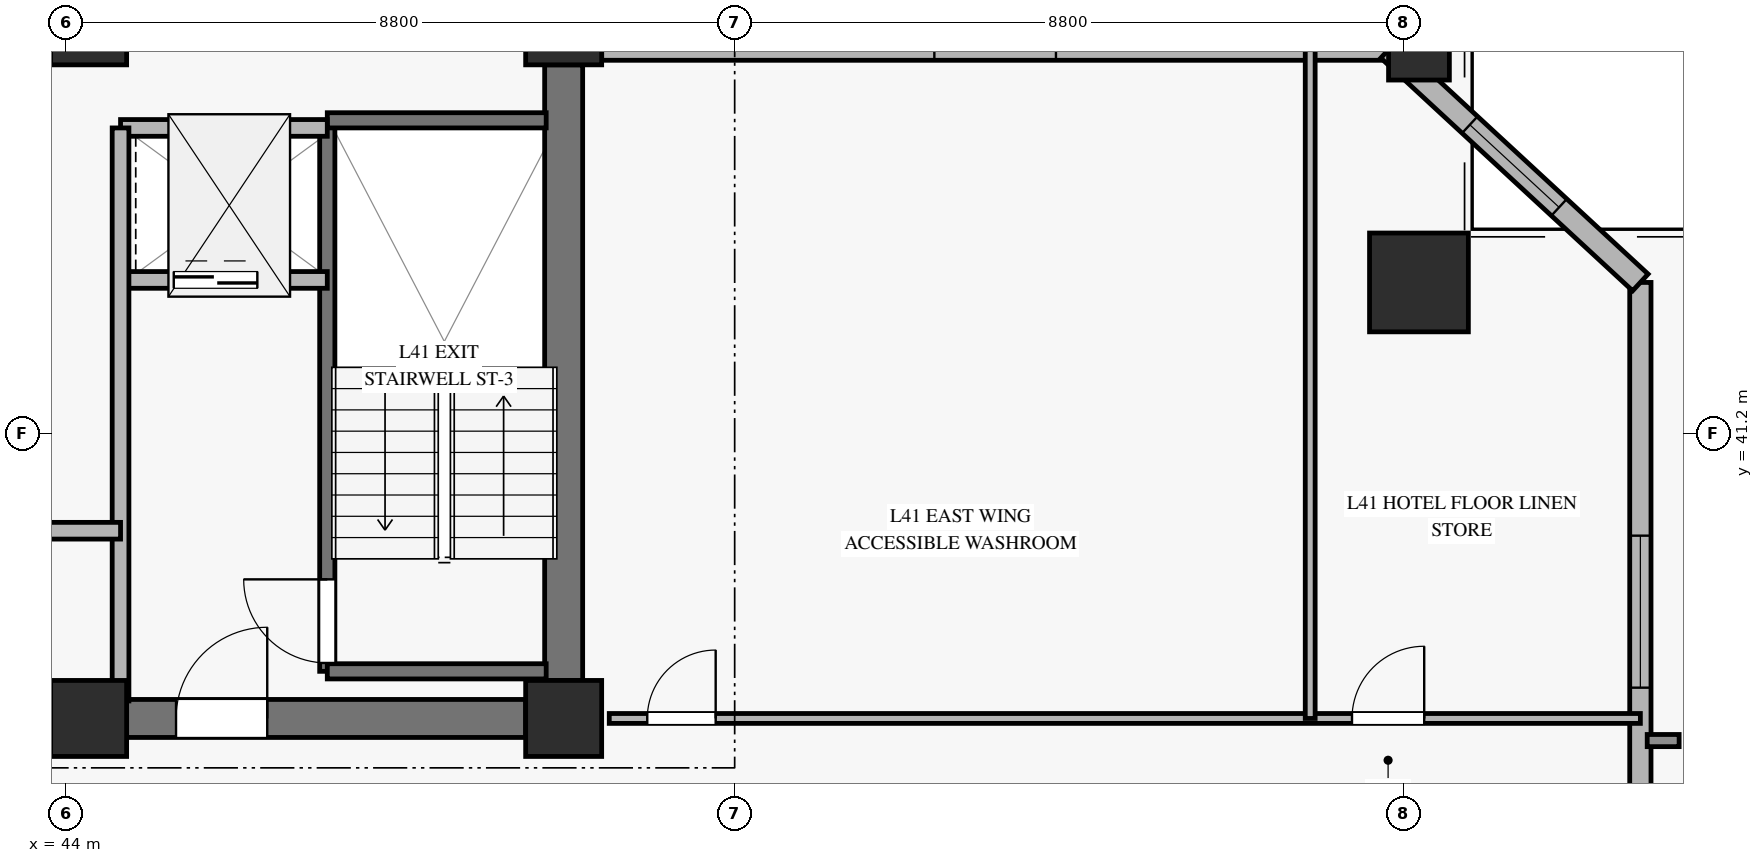
"""IFC4 building model, lengths in metres.
Left out: names, types, materials, properties, quantities, classifications, styles, units other than length and angle.
Written with IfcOpenShell. Run it as: python <this file> out.ifc"""

import sys

from ifc_helpers import new_model, si_unit, direction, frame, frame_2d, origin, origin_2d, place, context, subcontext, project, spatial, rectangle, hollow_rectangle, extrude, source, transform, mapped, element, fill, save


model = new_model("IFC4")
c1 = context("Model", 3, precision=1e-05, world=origin(), true_north=direction((0.0, 1.0)))
c2 = subcontext(c1, "Body", "Model", "MODEL_VIEW")
j1 = project(units=[si_unit("LENGTHUNIT", "METRE"), si_unit("PLANEANGLEUNIT", "RADIAN")], contexts=[c1])
p1 = place(None, origin())
s1 = spatial("IfcSite", under=j1, at=p1, CompositionType="ELEMENT")
p2 = place(p1, origin())
s2 = spatial("IfcBuilding", under=s1, at=p2, CompositionType="ELEMENT")
p3 = place(p2, frame((0.0, 0.0, 166.7)))
s3 = spatial("IfcBuildingStorey", under=s2, at=p3, CompositionType="ELEMENT", Elevation=166.7)
m1 = source(origin(), c2, "Body", "SweptSolid", [
    extrude(rectangle(XDim=1.0, YDim=1.0, at=origin_2d()), origin(), (0.0, 0.0, 1.0), 3.27),
])
for number, where, z_axis, x_axis in (
    (1, (44.3, 37.45, 0.0), (0.0, 0.0, 1.0), (1.0, 0.0, 0.0)),
    (2, (44.3, 46.55, 0.0), (0.0, 0.0, 1.0), (1.0, 0.0, 0.0)),
    (3, (50.55, 37.45, 0.0), (0.0, 0.0, 1.0), (1.0, 0.0, 0.0)),
    (4, (50.55, 46.55, 0.0), (0.0, 0.0, 1.0), (1.0, 0.0, 0.0)),
):
    element("IfcColumn", number, at=place(p3, frame(where, z_axis=z_axis, x_axis=x_axis)), inside=s3, PredefinedType="PILASTER", context=c2, shape_type="MappedRepresentation", body=[
        mapped(m1, transform((0.0, 0.0, 0.0), x_axis=(1.0, 0.0, 0.0), y_axis=(0.0, 1.0, 0.0), z_axis=(0.0, 0.0, 1.0), scale=1.0)),
    ])
p4 = place(p3, frame((44.8, 37.45, 0.0), z_axis=(0.0, 0.0, 1.0), x_axis=(1.0, 0.0, 0.0)))
e5 = element("IfcWall", 5, at=p4, inside=s3, PredefinedType="SHEAR", context=c2, shape_type="SweptSolid", body=[
    extrude(rectangle(XDim=5.25, YDim=0.5, at=frame_2d((2.625, 0.0))), origin(), (0.0, 0.0, 1.0), 3.27),
])
p5 = place(p4, frame((0.65, 0.0, 0.0)))
e6 = element("IfcOpeningElement", 6, at=p5, cuts=e5, PredefinedType="OPENING", context=c2, shape_type="SweptSolid", body=[
    extrude(rectangle(XDim=1.2, YDim=2.15, at=frame_2d((0.6, 1.075))), frame((0.0, 0.26, 0.0), z_axis=(0.0, -1.0, 0.0), x_axis=(1.0, 0.0, 0.0)), (0.0, 0.0, 1.0), 0.52),
])
p6 = place(p3, frame((50.55, 37.95, 0.0), z_axis=(0.0, 0.0, 1.0), x_axis=(0.0, 1.0, 0.0)))
e7 = element("IfcWall", 7, at=p6, inside=s3, PredefinedType="SHEAR", context=c2, shape_type="SweptSolid", body=[
    extrude(rectangle(XDim=8.1, YDim=0.5, at=frame_2d((4.05, 0.0))), origin(), (0.0, 0.0, 1.0), 3.27),
])
m2 = source(origin(), c2, "Body", "SweptSolid", [
    extrude(hollow_rectangle(XDim=1.3, YDim=1.3, WallThickness=0.06, at=origin_2d()), origin(), (0.0, 0.0, 1.0), 3.277),
])
p7 = place(p3, frame((61.803, 43.187, 0.0), z_axis=(-0.063777107469, 0.007897632467, 0.997932917567), x_axis=(-0.122893119903, -0.992419911671, 0.0)))
e8 = element("IfcColumn", 8, at=p7, inside=s3, PredefinedType="COLUMN", context=c2, shape_type="MappedRepresentation", body=[
    mapped(m2, transform((0.0, 0.0, 0.0), x_axis=(1.0, 0.0, 0.0), y_axis=(0.0, 1.0, 0.0), z_axis=(0.0, 0.0, 1.0), scale=1.0)),
])
m3 = source(origin(), c2, "Body", "SweptSolid", [
    extrude(hollow_rectangle(XDim=0.8, YDim=0.8, WallThickness=0.036, at=origin_2d()), origin(), (0.0, 0.0, 1.0), 3.277),
])
p8 = place(p3, frame((61.803, 46.25, 0.0), z_axis=(-0.063779096534, 0.0, 0.997964040858), x_axis=(0.0, -1.0, 0.0)))
e9 = element("IfcColumn", 9, at=p8, inside=s3, PredefinedType="COLUMN", context=c2, shape_type="MappedRepresentation", body=[
    mapped(m3, transform((0.0, 0.0, 0.0), x_axis=(1.0, 0.0, 0.0), y_axis=(0.0, 1.0, 0.0), z_axis=(0.0, 0.0, 1.0), scale=1.0)),
])
p9 = place(p3, frame((64.716, 27.999, 0.0), z_axis=(0.0, 0.0, 1.0), x_axis=(0.0, 1.0, 0.0)))
e10 = element("IfcWall", 10, at=p9, inside=s3, PredefinedType="SOLIDWALL", context=c2, shape_type="SweptSolid", body=[
    extrude(rectangle(XDim=15.188, YDim=0.28, at=frame_2d((7.594, 0.0))), origin(), (0.0, 0.0, 1.0), 2.75),
])
p10 = place(p9, frame((9.856, 0.0, 0.45)))
e11 = element("IfcOpeningElement", 11, at=p10, cuts=e10, PredefinedType="OPENING", context=c2, shape_type="SweptSolid", body=[
    extrude(rectangle(XDim=2.0, YDim=2.0, at=frame_2d((1.0, 1.0))), frame((0.0, 0.15, 0.0), z_axis=(0.0, -1.0, 0.0), x_axis=(1.0, 0.0, 0.0)), (0.0, 0.0, 1.0), 0.3),
])
p11 = place(p3, frame((51.05, 46.25, 0.0), z_axis=(0.0, 0.0, 1.0), x_axis=(1.0, 0.0, 0.0)))
e12 = element("IfcWall", 12, at=p11, inside=s3, PredefinedType="SOLIDWALL", context=c2, shape_type="SweptSolid", body=[
    extrude(rectangle(XDim=10.353, YDim=0.28, at=frame_2d((5.177, 0.0))), origin(), (0.0, 0.0, 1.0), 2.75),
])
p12 = place(p11, frame((4.377, 0.0, 0.45)))
e13 = element("IfcOpeningElement", 13, at=p12, cuts=e12, PredefinedType="OPENING", context=c2, shape_type="SweptSolid", body=[
    extrude(rectangle(XDim=1.6, YDim=2.0, at=frame_2d((0.8, 1.0))), frame((0.0, 0.15, 0.0), z_axis=(0.0, -1.0, 0.0), x_axis=(1.0, 0.0, 0.0)), (0.0, 0.0, 1.0), 0.3),
])
p13 = place(p3, frame((64.716, 43.187, 0.0), z_axis=(0.0, 0.0, 1.0), x_axis=(-0.734267997056, 0.678859711943, 0.0)))
e14 = element("IfcWall", 14, at=p13, inside=s3, PredefinedType="SOLIDWALL", context=c2, shape_type="SweptSolid", body=[
    extrude(rectangle(XDim=4.512, YDim=0.3, at=frame_2d((2.256, 0.0))), origin(), (0.0, 0.0, 1.0), 2.75),
])
p14 = place(p13, frame((1.456, 0.0, 0.45)))
e15 = element("IfcOpeningElement", 15, at=p14, cuts=e14, PredefinedType="OPENING", context=c2, shape_type="SweptSolid", body=[
    extrude(rectangle(XDim=1.6, YDim=2.0, at=frame_2d((0.8, 1.0))), frame((0.0, 0.16, 0.0), z_axis=(0.0, -1.0, 0.0), x_axis=(1.0, 0.0, 0.0)), (0.0, 0.0, 1.0), 0.32),
])
p15 = place(p3, frame((47.44, 38.07, 0.0), z_axis=(0.0, 0.0, 1.0), x_axis=(0.0, 1.0, 0.0)))
e16 = element("IfcWall", 16, at=p15, inside=s3, PredefinedType="SOLIDWALL", context=c2, shape_type="SweptSolid", body=[
    extrude(rectangle(XDim=7.25, YDim=0.2, at=frame_2d((3.625, 0.0))), origin(), (0.0, 0.0, 1.0), 3.5),
])
p16 = place(p15, frame((0.11, 0.0, 0.0)))
e17 = element("IfcOpeningElement", 17, at=p16, cuts=e16, PredefinedType="OPENING", context=c2, shape_type="SweptSolid", body=[
    extrude(rectangle(XDim=1.1, YDim=2.15, at=frame_2d((0.55, 1.075))), frame((0.0, 0.11, 0.0), z_axis=(0.0, -1.0, 0.0), x_axis=(1.0, 0.0, 0.0)), (0.0, 0.0, 1.0), 0.22),
])
for number, where, z_axis, x_axis in (
    (18, (47.44, 45.32, 0.0), (0.0, 0.0, 1.0), (1.0, 0.0, 0.0)),
    (19, (47.44, 38.07, 0.0), (0.0, 0.0, 1.0), (1.0, 0.0, 0.0)),
):
    element("IfcWall", number, at=place(p3, frame(where, z_axis=z_axis, x_axis=x_axis)), inside=s3, PredefinedType="SOLIDWALL", context=c2, shape_type="SweptSolid", body=[
        extrude(rectangle(XDim=2.88, YDim=0.2, at=frame_2d((1.44, 0.0))), origin(), (0.0, 0.0, 1.0), 3.5),
    ])
p17 = place(p3, frame((44.72, 43.22, 0.0), z_axis=(0.0, 0.0, 1.0), x_axis=(1.0, 0.0, 0.0)))
e20 = element("IfcWall", 20, at=p17, inside=s3, PredefinedType="SOLIDWALL", context=c2, shape_type="SweptSolid", body=[
    extrude(rectangle(XDim=2.72, YDim=0.22, at=frame_2d((1.36, 0.0))), origin(), (0.0, 0.0, 1.0), 3.27),
])
p18 = place(p17, frame((0.7, 0.0, 0.0)))
e21 = element("IfcOpeningElement", 21, at=p18, cuts=e20, PredefinedType="OPENING", context=c2, shape_type="SweptSolid", body=[
    extrude(rectangle(XDim=1.1, YDim=2.2, at=frame_2d((0.55, 1.1))), frame((0.0, 0.12, 0.0), z_axis=(0.0, -1.0, 0.0), x_axis=(1.0, 0.0, 0.0)), (0.0, 0.0, 1.0), 0.24),
])
p19 = place(p3, frame((44.72, 45.22, 0.0), z_axis=(0.0, 0.0, 1.0), x_axis=(1.0, 0.0, 0.0)))
e22 = element("IfcWall", 22, at=p19, inside=s3, PredefinedType="SOLIDWALL", context=c2, shape_type="SweptSolid", body=[
    extrude(rectangle(XDim=2.72, YDim=0.22, at=frame_2d((1.36, 0.0))), origin(), (0.0, 0.0, 1.0), 3.27),
])
p20 = place(p3, frame((44.72, 37.68, 0.0), z_axis=(0.0, 0.0, 1.0), x_axis=(0.0, 1.0, 0.0)))
e23 = element("IfcWall", 23, at=p20, inside=s3, PredefinedType="SOLIDWALL", context=c2, shape_type="SweptSolid", body=[
    extrude(rectangle(XDim=7.54, YDim=0.22, at=frame_2d((3.77, 0.0))), origin(), (0.0, 0.0, 1.0), 3.27),
])
p21 = place(p3, frame((36.12, 39.92, 0.0), z_axis=(0.0, 0.0, 1.0), x_axis=(1.0, 0.0, 0.0)))
e24 = element("IfcWall", 24, at=p21, inside=s3, PredefinedType="SOLIDWALL", context=c2, shape_type="SweptSolid", body=[
    extrude(rectangle(XDim=8.6, YDim=0.22, at=frame_2d((4.3, 0.0))), origin(), (0.0, 0.0, 1.0), 2.555),
])
p22 = place(p3, frame((51.15, 37.45, 0.0), z_axis=(0.0, 0.0, 1.0), x_axis=(1.0, 0.0, 0.0)))
e25 = element("IfcWall", 25, at=p22, inside=s3, PredefinedType="PARTITIONING", context=c2, shape_type="SweptSolid", body=[
    extrude(rectangle(XDim=13.566, YDim=0.13, at=frame_2d((6.783, 0.0))), origin(), (0.0, 0.0, 1.0), 2.755),
])
p23 = place(p22, frame((0.5, 0.0, 0.0)))
e26 = element("IfcOpeningElement", 26, at=p23, cuts=e25, PredefinedType="OPENING", context=c2, shape_type="SweptSolid", body=[
    extrude(rectangle(XDim=0.9, YDim=2.1, at=frame_2d((0.45, 1.05))), frame((0.0, 0.075, 0.0), z_axis=(0.0, -1.0, 0.0), x_axis=(1.0, 0.0, 0.0)), (0.0, 0.0, 1.0), 0.15),
])
p24 = place(p22, frame((9.772, 0.0, 0.0)))
e27 = element("IfcOpeningElement", 27, at=p24, cuts=e25, PredefinedType="OPENING", context=c2, shape_type="SweptSolid", body=[
    extrude(rectangle(XDim=0.95, YDim=2.1, at=frame_2d((0.475, 1.05))), frame((0.0, 0.075, 0.0), z_axis=(0.0, -1.0, 0.0), x_axis=(1.0, 0.0, 0.0)), (0.0, 0.0, 1.0), 0.15),
])
p25 = place(p3, frame((60.372, 37.45, 0.0), z_axis=(0.0, 0.0, 1.0), x_axis=(0.0, 1.0, 0.0)))
e28 = element("IfcWall", 28, at=p25, inside=s3, PredefinedType="PARTITIONING", context=c2, shape_type="SweptSolid", body=[
    extrude(rectangle(XDim=8.8, YDim=0.13, at=frame_2d((4.4, 0.0))), origin(), (0.0, 0.0, 1.0), 3.27),
])
m4 = source(origin(), c2, "Body", "SweptSolid", [
    extrude(rectangle(XDim=2.0, YDim=2.0, at=frame_2d((1.0, 1.0))), frame((0.0, 0.03, 0.0), z_axis=(0.0, -1.0, 0.0), x_axis=(1.0, 0.0, 0.0)), (0.0, 0.0, 1.0), 0.06),
])
p26 = place(p10, origin())
e29 = element("IfcWindow", 29, at=p26, inside=s3, PartitioningType="SINGLE_PANEL", PredefinedType="WINDOW", context=c2, shape_type="MappedRepresentation", body=[
    mapped(m4, transform((0.0, 0.0, 0.0), x_axis=(1.0, 0.0, 0.0), y_axis=(0.0, 1.0, 0.0), z_axis=(0.0, 0.0, 1.0), scale=1.0)),
])
fill(e11, e29)
m5 = source(origin(), c2, "Body", "SweptSolid", [
    extrude(rectangle(XDim=1.6, YDim=2.0, at=frame_2d((0.8, 1.0))), frame((0.0, 0.03, 0.0), z_axis=(0.0, -1.0, 0.0), x_axis=(1.0, 0.0, 0.0)), (0.0, 0.0, 1.0), 0.06),
])
p27 = place(p14, origin())
e30 = element("IfcWindow", 30, at=p27, inside=s3, PartitioningType="SINGLE_PANEL", PredefinedType="WINDOW", context=c2, shape_type="MappedRepresentation", body=[
    mapped(m5, transform((0.0, 0.0, 0.0), x_axis=(1.0, 0.0, 0.0), y_axis=(0.0, 1.0, 0.0), z_axis=(0.0, 0.0, 1.0), scale=1.0)),
])
fill(e15, e30)
m6 = source(origin(), c2, "Body", "SweptSolid", [
    extrude(rectangle(XDim=1.1, YDim=2.15, at=frame_2d((0.55, 1.075))), frame((0.0, 0.025, 0.0), z_axis=(0.0, -1.0, 0.0), x_axis=(1.0, 0.0, 0.0)), (0.0, 0.0, 1.0), 0.05),
])
p28 = place(p16, origin())
e31 = element("IfcDoor", 31, at=p28, inside=s3, OperationType="SINGLE_SWING_RIGHT", PredefinedType="DOOR", context=c2, shape_type="MappedRepresentation", body=[
    mapped(m6, transform((0.0, 0.0, 0.0), x_axis=(1.0, 0.0, 0.0), y_axis=(0.0, 1.0, 0.0), z_axis=(0.0, 0.0, 1.0), scale=1.0)),
])
fill(e17, e31)
m7 = source(origin(), c2, "Body", "SweptSolid", [
    extrude(rectangle(XDim=1.1, YDim=2.2, at=frame_2d((0.55, 1.1))), frame((0.0, 0.025, 0.0), z_axis=(0.0, -1.0, 0.0), x_axis=(1.0, 0.0, 0.0)), (0.0, 0.0, 1.0), 0.05),
])
p29 = place(p18, origin())
e32 = element("IfcDoor", 32, at=p29, inside=s3, OperationType="SLIDING_TO_LEFT", PredefinedType="DOOR", context=c2, shape_type="MappedRepresentation", body=[
    mapped(m7, transform((0.0, 0.0, 0.0), x_axis=(1.0, 0.0, 0.0), y_axis=(0.0, 1.0, 0.0), z_axis=(0.0, 0.0, 1.0), scale=1.0)),
])
fill(e21, e32)
m8 = source(origin(), c2, "Body", "SweptSolid", [
    extrude(rectangle(XDim=1.2, YDim=2.15, at=frame_2d((0.6, 1.075))), frame((0.0, 0.025, 0.0), z_axis=(0.0, -1.0, 0.0), x_axis=(1.0, 0.0, 0.0)), (0.0, 0.0, 1.0), 0.05),
])
p30 = place(p5, origin())
e33 = element("IfcDoor", 33, at=p30, inside=s3, OperationType="SINGLE_SWING_RIGHT", PredefinedType="DOOR", context=c2, shape_type="MappedRepresentation", body=[
    mapped(m8, transform((0.0, 0.0, 0.0), x_axis=(1.0, 0.0, 0.0), y_axis=(0.0, 1.0, 0.0), z_axis=(0.0, 0.0, 1.0), scale=1.0)),
])
fill(e6, e33)
m9 = source(origin(), c2, "Body", "SweptSolid", [
    extrude(rectangle(XDim=0.9, YDim=2.1, at=frame_2d((0.45, 1.05))), frame((0.0, 0.025, 0.0), z_axis=(0.0, -1.0, 0.0), x_axis=(1.0, 0.0, 0.0)), (0.0, 0.0, 1.0), 0.05),
])
p31 = place(p23, origin())
e34 = element("IfcDoor", 34, at=p31, inside=s3, OperationType="SINGLE_SWING_RIGHT", PredefinedType="DOOR", context=c2, shape_type="MappedRepresentation", body=[
    mapped(m9, transform((0.0, 0.0, 0.0), x_axis=(1.0, 0.0, 0.0), y_axis=(0.0, 1.0, 0.0), z_axis=(0.0, 0.0, 1.0), scale=1.0)),
])
fill(e26, e34)
m10 = source(origin(), c2, "Body", "SweptSolid", [
    extrude(rectangle(XDim=0.95, YDim=2.1, at=frame_2d((0.475, 1.05))), frame((0.0, 0.025, 0.0), z_axis=(0.0, -1.0, 0.0), x_axis=(1.0, 0.0, 0.0)), (0.0, 0.0, 1.0), 0.05),
])
p32 = place(p24, origin())
e35 = element("IfcDoor", 35, at=p32, inside=s3, OperationType="SINGLE_SWING_RIGHT", PredefinedType="DOOR", context=c2, shape_type="MappedRepresentation", body=[
    mapped(m10, transform((0.0, 0.0, 0.0), x_axis=(1.0, 0.0, 0.0), y_axis=(0.0, 1.0, 0.0), z_axis=(0.0, 0.0, 1.0), scale=1.0)),
])
fill(e27, e35)
save(model, sys.argv[1])
